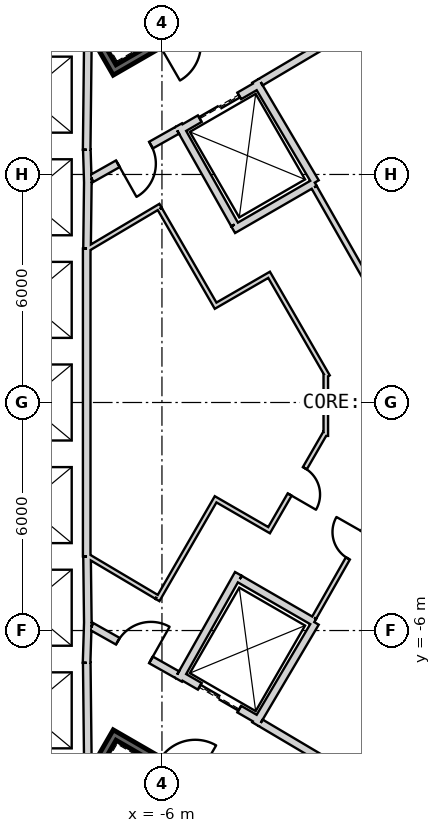
"""IFC4 building model, lengths in metres.
Left out: names, types, materials, properties, quantities, classifications, styles, units other than length and angle.
Written with IfcOpenShell. Run it as: python <this file> out.ifc"""

import sys

from ifc_helpers import new_model, si_unit, direction, frame, frame_2d, origin, place, context, subcontext, project, spatial, rectangle, extrude, element, fill, save


model = new_model("IFC4")
c1 = context("Model", 3, precision=1e-05, world=origin(), true_north=direction((0.0, 1.0)))
c2 = subcontext(c1, "Body", "Model", "MODEL_VIEW")
j1 = project(units=[si_unit("LENGTHUNIT", "METRE"), si_unit("PLANEANGLEUNIT", "RADIAN")], contexts=[c1])
p1 = place(None, origin())
s1 = spatial("IfcSite", under=j1, at=p1, CompositionType="ELEMENT")
p2 = place(p1, origin())
s2 = spatial("IfcBuilding", under=s1, at=p2, CompositionType="ELEMENT")
p3 = place(p2, frame((0.0, 0.0, 322.1)))
s3 = spatial("IfcBuildingStorey", under=s2, at=p3, CompositionType="ELEMENT", Elevation=322.1)
p4 = place(p3, frame((19.475, 2.208, 0.0), z_axis=(0.0, 0.0, 1.0), x_axis=(-0.866028369851, 0.499994862586, 0.0)))
e1 = element("IfcWall", 1, at=p4, inside=s3, PredefinedType="SHEAR", context=c2, shape_type="SweptSolid", body=[
    extrude(rectangle(XDim=31.523, YDim=0.9, at=frame_2d((15.762, 0.0))), origin(), (0.0, 0.0, 1.0), 3.9),
])
p5 = place(p4, frame((7.062, 0.0, 0.0)))
e2 = element("IfcOpeningElement", 2, at=p5, cuts=e1, PredefinedType="OPENING", context=c2, shape_type="SweptSolid", body=[
    extrude(rectangle(XDim=1.2, YDim=2.4, at=frame_2d((0.6, 1.2))), frame((0.0, 0.46, 0.0), z_axis=(0.0, -1.0, 0.0), x_axis=(1.0, 0.0, 0.0)), (0.0, 0.0, 1.0), 0.92),
])
p6 = place(p4, frame((3.612, 0.0, 0.0)))
e3 = element("IfcOpeningElement", 3, at=p6, cuts=e1, PredefinedType="OPENING", context=c2, shape_type="SweptSolid", body=[
    extrude(rectangle(XDim=1.2, YDim=2.4, at=frame_2d((0.6, 1.2))), frame((0.0, 0.46, 0.0), z_axis=(0.0, -1.0, 0.0), x_axis=(1.0, 0.0, 0.0)), (0.0, 0.0, 1.0), 0.92),
])
p7 = place(p4, frame((26.712, 0.0, 0.0)))
e4 = element("IfcOpeningElement", 4, at=p7, cuts=e1, PredefinedType="OPENING", context=c2, shape_type="SweptSolid", body=[
    extrude(rectangle(XDim=1.2, YDim=2.4, at=frame_2d((0.6, 1.2))), frame((0.0, 0.46, 0.0), z_axis=(0.0, -1.0, 0.0), x_axis=(1.0, 0.0, 0.0)), (0.0, 0.0, 1.0), 0.92),
])
p8 = place(p3, frame((-7.825, -17.97, 0.0), z_axis=(0.0, 0.0, 1.0), x_axis=(0.866028369851, 0.499994862586, 0.0)))
e5 = element("IfcWall", 5, at=p8, inside=s3, PredefinedType="SHEAR", context=c2, shape_type="SweptSolid", body=[
    extrude(rectangle(XDim=31.523, YDim=0.9, at=frame_2d((15.762, 0.0))), origin(), (0.0, 0.0, 1.0), 3.9),
])
p9 = place(p8, frame((17.862, 0.0, 0.0)))
e6 = element("IfcOpeningElement", 6, at=p9, cuts=e5, PredefinedType="OPENING", context=c2, shape_type="SweptSolid", body=[
    extrude(rectangle(XDim=1.2, YDim=2.4, at=frame_2d((0.6, 1.2))), frame((0.0, 0.46, 0.0), z_axis=(0.0, -1.0, 0.0), x_axis=(1.0, 0.0, 0.0)), (0.0, 0.0, 1.0), 0.92),
])
p10 = place(p8, frame((20.562, 0.0, 0.0)))
e7 = element("IfcOpeningElement", 7, at=p10, cuts=e5, PredefinedType="OPENING", context=c2, shape_type="SweptSolid", body=[
    extrude(rectangle(XDim=1.2, YDim=2.4, at=frame_2d((0.6, 1.2))), frame((0.0, 0.46, 0.0), z_axis=(0.0, -1.0, 0.0), x_axis=(1.0, 0.0, 0.0)), (0.0, 0.0, 1.0), 0.92),
])
p11 = place(p8, frame((26.712, 0.0, 0.0)))
e8 = element("IfcOpeningElement", 8, at=p11, cuts=e5, PredefinedType="OPENING", context=c2, shape_type="SweptSolid", body=[
    extrude(rectangle(XDim=1.2, YDim=2.4, at=frame_2d((0.6, 1.2))), frame((0.0, 0.46, 0.0), z_axis=(0.0, -1.0, 0.0), x_axis=(1.0, 0.0, 0.0)), (0.0, 0.0, 1.0), 0.92),
])
p12 = place(p8, frame((3.612, 0.0, 0.0)))
e9 = element("IfcOpeningElement", 9, at=p12, cuts=e5, PredefinedType="OPENING", context=c2, shape_type="SweptSolid", body=[
    extrude(rectangle(XDim=1.2, YDim=2.4, at=frame_2d((0.6, 1.2))), frame((0.0, 0.46, 0.0), z_axis=(0.0, -1.0, 0.0), x_axis=(1.0, 0.0, 0.0)), (0.0, 0.0, 1.0), 0.92),
])
p13 = place(p3, frame((-7.951, 9.35, 0.0), z_axis=(0.0, 0.0, 1.0), x_axis=(-0.011120469654, -0.999938165666, 0.0)))
e10 = element("IfcWall", 10, at=p13, inside=s3, PredefinedType="PLUMBINGWALL", context=c2, shape_type="SweptSolid", body=[
    extrude(rectangle(XDim=2.7, YDim=0.2, at=frame_2d((1.35, 0.0))), origin(), (0.0, 0.0, 1.0), 3.6),
])
p14 = place(p3, frame((-7.977, 6.65, 0.0), z_axis=(0.0, 0.0, 1.0), x_axis=(0.030861509705, -0.999523670164, 0.0)))
e11 = element("IfcWall", 11, at=p14, inside=s3, PredefinedType="PLUMBINGWALL", context=c2, shape_type="SweptSolid", body=[
    extrude(rectangle(XDim=0.878, YDim=0.2, at=frame_2d((0.439, 0.0))), origin(), (0.0, 0.0, 1.0), 3.6),
])
p15 = place(p3, frame((-7.949, 5.895, 0.0), z_axis=(0.0, 0.0, 1.0), x_axis=(-0.012042535896, -0.999927486035, 0.0)))
e12 = element("IfcWall", 12, at=p15, inside=s3, PredefinedType="PLUMBINGWALL", context=c2, shape_type="SweptSolid", body=[
    extrude(rectangle(XDim=1.845, YDim=0.2, at=frame_2d((0.922, 0.0))), origin(), (0.0, 0.0, 1.0), 3.6),
])
p16 = place(p3, frame((-7.98, 4.05, 0.0), z_axis=(0.0, 0.0, 1.0), x_axis=(0.0, -1.0, 0.0)))
e13 = element("IfcWall", 13, at=p16, inside=s3, PredefinedType="PLUMBINGWALL", context=c2, shape_type="SweptSolid", body=[
    extrude(rectangle(XDim=8.1, YDim=0.2, at=frame_2d((4.05, 0.0))), origin(), (0.0, 0.0, 1.0), 3.6),
])
p17 = place(p3, frame((-7.95, -5.772, 0.0), z_axis=(0.0, 0.0, 1.0), x_axis=(-0.030803413295, -0.999525462272, 0.0)))
e14 = element("IfcWall", 14, at=p17, inside=s3, PredefinedType="PLUMBINGWALL", context=c2, shape_type="SweptSolid", body=[
    extrude(rectangle(XDim=1.078, YDim=0.2, at=frame_2d((0.539, 0.0))), origin(), (0.0, 0.0, 1.0), 3.6),
])
p18 = place(p3, frame((-7.971, -4.05, 0.0), z_axis=(0.0, 0.0, 1.0), x_axis=(0.012042535896, -0.999927486035, 0.0)))
e15 = element("IfcWall", 15, at=p18, inside=s3, PredefinedType="PLUMBINGWALL", context=c2, shape_type="SweptSolid", body=[
    extrude(rectangle(XDim=1.845, YDim=0.2, at=frame_2d((0.922, 0.0))), origin(), (0.0, 0.0, 1.0), 3.6),
])
p19 = place(p3, frame((-7.979, -6.85, 0.0), z_axis=(0.0, 0.0, 1.0), x_axis=(0.011121475088, -0.999938154483, 0.0)))
e16 = element("IfcWall", 16, at=p19, inside=s3, PredefinedType="PLUMBINGWALL", context=c2, shape_type="SweptSolid", body=[
    extrude(rectangle(XDim=2.7, YDim=0.2, at=frame_2d((1.35, 0.0))), origin(), (0.0, 0.0, 1.0), 3.6),
])
p20 = place(p3, frame((-11.245, 15.678, -0.3), z_axis=(0.0, 0.0, 1.0), x_axis=(0.499977274689, -0.866038523851, 0.0)))
e17 = element("IfcWall", 17, at=p20, inside=s3, PredefinedType="SHEAR", context=c2, shape_type="SweptSolid", body=[
    extrude(rectangle(XDim=8.1, YDim=0.2, at=frame_2d((4.05, 0.0))), origin(), (0.0, 0.0, 1.0), 3.9),
])
p21 = place(p3, frame((-7.159, 8.8, -0.3), z_axis=(0.0, 0.0, 1.0), x_axis=(0.866047807691, 0.499961193289, 0.0)))
e18 = element("IfcWall", 18, at=p21, inside=s3, PredefinedType="SHEAR", context=c2, shape_type="SweptSolid", body=[
    extrude(rectangle(XDim=3.6, YDim=0.2, at=frame_2d((1.8, 0.0))), origin(), (0.0, 0.0, 1.0), 3.9),
])
p22 = place(p21, frame((1.25, 0.0, 0.3)))
e19 = element("IfcOpeningElement", 19, at=p22, cuts=e18, PredefinedType="OPENING", context=c2, shape_type="SweptSolid", body=[
    extrude(rectangle(XDim=1.1, YDim=2.1, at=frame_2d((0.55, 1.05))), frame((0.0, 0.11, 0.0), z_axis=(0.0, -1.0, 0.0), x_axis=(1.0, 0.0, 0.0)), (0.0, 0.0, 1.0), 0.22),
])
p23 = place(p3, frame((-5.524, 7.168, 0.0), z_axis=(0.0, 0.0, 1.0), x_axis=(0.866024647952, 0.500001309137, 0.0)))
e20 = element("IfcWall", 20, at=p23, inside=s3, PredefinedType="PLUMBINGWALL", context=c2, shape_type="SweptSolid", body=[
    extrude(rectangle(XDim=2.4, YDim=0.2, at=frame_2d((1.2, 0.0))), origin(), (0.0, 0.0, 1.0), 3.6),
])
p24 = place(p23, frame((0.6, 0.0, 0.0)))
e21 = element("IfcOpeningElement", 21, at=p24, cuts=e20, PredefinedType="OPENING", context=c2, shape_type="SweptSolid", body=[
    extrude(rectangle(XDim=1.2, YDim=2.4, at=frame_2d((0.6, 1.2))), frame((0.0, 0.11, 0.0), z_axis=(0.0, -1.0, 0.0), x_axis=(1.0, 0.0, 0.0)), (0.0, 0.0, 1.0), 0.22),
])
p25 = place(p3, frame((-3.538, 8.465, 0.0), z_axis=(0.0, 0.0, 1.0), x_axis=(0.508647062354, -0.860975125052, 0.0)))
e22 = element("IfcWall", 22, at=p25, inside=s3, PredefinedType="PLUMBINGWALL", context=c2, shape_type="SweptSolid", body=[
    extrude(rectangle(XDim=3.1, YDim=0.2, at=frame_2d((1.55, 0.0))), origin(), (0.0, 0.0, 1.0), 3.6),
])
p26 = place(p3, frame((-1.979, 5.786, 0.0), z_axis=(0.0, 0.0, 1.0), x_axis=(-0.866016689309, -0.500015093611, 0.0)))
e23 = element("IfcWall", 23, at=p26, inside=s3, PredefinedType="PLUMBINGWALL", context=c2, shape_type="SweptSolid", body=[
    extrude(rectangle(XDim=2.479, YDim=0.2, at=frame_2d((1.24, 0.0))), origin(), (0.0, 0.0, 1.0), 3.6),
])
p27 = place(p3, frame((-5.562, 7.296, 0.0), z_axis=(0.0, 0.0, 1.0), x_axis=(0.49134651263, -0.870964180966, 0.0)))
e24 = element("IfcWall", 24, at=p27, inside=s3, PredefinedType="PLUMBINGWALL", context=c2, shape_type="SweptSolid", body=[
    extrude(rectangle(XDim=3.0, YDim=0.2, at=frame_2d((1.5, 0.0))), origin(), (0.0, 0.0, 1.0), 3.6),
])
p28 = place(p3, frame((-7.196, -8.663, -0.3), z_axis=(0.0, 0.0, 1.0), x_axis=(-0.499997992926, -0.866026562566, 0.0)))
e25 = element("IfcWall", 25, at=p28, inside=s3, PredefinedType="SHEAR", context=c2, shape_type="SweptSolid", body=[
    extrude(rectangle(XDim=7.9, YDim=0.2, at=frame_2d((3.95, 0.0))), origin(), (0.0, 0.0, 1.0), 3.9),
])
p29 = place(p3, frame((-4.041, -10.599, -0.3), z_axis=(0.0, 0.0, 1.0), x_axis=(-0.866047807691, 0.499961193289, 0.0)))
e26 = element("IfcWall", 26, at=p29, inside=s3, PredefinedType="SHEAR", context=c2, shape_type="SweptSolid", body=[
    extrude(rectangle(XDim=3.6, YDim=0.2, at=frame_2d((1.8, 0.0))), origin(), (0.0, 0.0, 1.0), 3.9),
])
p30 = place(p29, frame((1.25, 0.0, 0.3)))
e27 = element("IfcOpeningElement", 27, at=p30, cuts=e26, PredefinedType="OPENING", context=c2, shape_type="SweptSolid", body=[
    extrude(rectangle(XDim=1.1, YDim=2.1, at=frame_2d((0.55, 1.05))), frame((0.0, 0.11, 0.0), z_axis=(0.0, -1.0, 0.0), x_axis=(1.0, 0.0, 0.0)), (0.0, 0.0, 1.0), 0.22),
])
p31 = place(p3, frame((-3.446, -8.368, 0.0), z_axis=(0.0, 0.0, 1.0), x_axis=(-0.866024647952, 0.500001309137, 0.0)))
e28 = element("IfcWall", 28, at=p31, inside=s3, PredefinedType="PLUMBINGWALL", context=c2, shape_type="SweptSolid", body=[
    extrude(rectangle(XDim=2.4, YDim=0.2, at=frame_2d((1.2, 0.0))), origin(), (0.0, 0.0, 1.0), 3.6),
])
p32 = place(p31, frame((0.6, 0.0, 0.0)))
e29 = element("IfcOpeningElement", 29, at=p32, cuts=e28, PredefinedType="OPENING", context=c2, shape_type="SweptSolid", body=[
    extrude(rectangle(XDim=1.2, YDim=2.4, at=frame_2d((0.6, 1.2))), frame((0.0, 0.11, 0.0), z_axis=(0.0, -1.0, 0.0), x_axis=(1.0, 0.0, 0.0)), (0.0, 0.0, 1.0), 0.22),
])
p33 = place(p3, frame((-1.961, -5.796, 0.0), z_axis=(0.0, 0.0, 1.0), x_axis=(-0.508647062354, -0.860975125052, 0.0)))
e30 = element("IfcWall", 30, at=p33, inside=s3, PredefinedType="PLUMBINGWALL", context=c2, shape_type="SweptSolid", body=[
    extrude(rectangle(XDim=3.1, YDim=0.2, at=frame_2d((1.55, 0.0))), origin(), (0.0, 0.0, 1.0), 3.6),
])
p34 = place(p3, frame((-3.99, -4.509, 0.0), z_axis=(0.0, 0.0, 1.0), x_axis=(-0.491358283181, -0.870957540612, 0.0)))
e31 = element("IfcWall", 31, at=p34, inside=s3, PredefinedType="PLUMBINGWALL", context=c2, shape_type="SweptSolid", body=[
    extrude(rectangle(XDim=3.2, YDim=0.2, at=frame_2d((1.6, 0.0))), origin(), (0.0, 0.0, 1.0), 3.6),
])
p35 = place(p3, frame((-3.953, -4.646, 0.0), z_axis=(0.0, 0.0, 1.0), x_axis=(0.866065302921, -0.4999308863, 0.0)))
e32 = element("IfcWall", 32, at=p35, inside=s3, PredefinedType="PLUMBINGWALL", context=c2, shape_type="SweptSolid", body=[
    extrude(rectangle(XDim=2.264, YDim=0.2, at=frame_2d((1.132, 0.0))), origin(), (0.0, 0.0, 1.0), 3.6),
])
p36 = place(p3, frame((5.159, 6.236, 0.0), z_axis=(0.0, 0.0, 1.0), x_axis=(-0.868105023632, 0.496380567654, 0.0)))
e33 = element("IfcWall", 33, at=p36, inside=s3, PredefinedType="PLUMBINGWALL", context=c2, shape_type="SweptSolid", body=[
    extrude(rectangle(XDim=7.072, YDim=0.15, at=frame_2d((3.536, 0.0))), origin(), (0.0, 0.0, 1.0), 3.6),
])
p37 = place(p3, frame((-1.023, -9.772, 0.0), z_axis=(0.0, 0.0, 1.0), x_axis=(0.874290944206, 0.485402250592, 0.0)))
e34 = element("IfcWall", 34, at=p37, inside=s3, PredefinedType="PARTITIONING", context=c2, shape_type="SweptSolid", body=[
    extrude(rectangle(XDim=1.723, YDim=0.12, at=frame_2d((0.861, 0.0))), origin(), (0.0, 0.0, 1.0), 3.6),
])
p38 = place(p3, frame((-1.055, 9.818, 0.0), z_axis=(0.0, 0.0, 1.0), x_axis=(-0.860614334655, -0.50925726994, 0.0)))
e35 = element("IfcWall", 35, at=p38, inside=s3, PredefinedType="PARTITIONING", context=c2, shape_type="SweptSolid", body=[
    extrude(rectangle(XDim=2.726, YDim=0.2, at=frame_2d((1.363, 0.0))), origin(), (0.0, 0.0, 1.0), 3.6),
])
p39 = place(p3, frame((-5.6, 7.16, 0.0), z_axis=(0.0, 0.0, 1.0), x_axis=(-0.871363259478, -0.490638431059, 0.0)))
e36 = element("IfcWall", 36, at=p39, inside=s3, PredefinedType="PARTITIONING", context=c2, shape_type="SweptSolid", body=[
    extrude(rectangle(XDim=2.581, YDim=0.2, at=frame_2d((1.291, 0.0))), origin(), (0.0, 0.0, 1.0), 3.6),
])
p40 = place(p39, frame((0.791, 0.0, 0.0)))
e37 = element("IfcOpeningElement", 37, at=p40, cuts=e36, PredefinedType="OPENING", context=c2, shape_type="SweptSolid", body=[
    extrude(rectangle(XDim=1.0, YDim=2.1, at=frame_2d((0.5, 1.05))), frame((0.0, 0.11, 0.0), z_axis=(0.0, -1.0, 0.0), x_axis=(1.0, 0.0, 0.0)), (0.0, 0.0, 1.0), 0.22),
])
p41 = place(p3, frame((-3.401, -8.43, 0.0), z_axis=(0.0, 0.0, 1.0), x_axis=(0.860630814782, -0.509229418482, 0.0)))
e38 = element("IfcWall", 38, at=p41, inside=s3, PredefinedType="PARTITIONING", context=c2, shape_type="SweptSolid", body=[
    extrude(rectangle(XDim=2.582, YDim=0.2, at=frame_2d((1.291, 0.0))), origin(), (0.0, 0.0, 1.0), 3.6),
])
p42 = place(p3, frame((-7.849, -5.894, 0.0), z_axis=(0.0, 0.0, 1.0), x_axis=(0.871363259478, -0.490638431059, 0.0)))
e39 = element("IfcWall", 39, at=p42, inside=s3, PredefinedType="PARTITIONING", context=c2, shape_type="SweptSolid", body=[
    extrude(rectangle(XDim=2.581, YDim=0.2, at=frame_2d((1.291, 0.0))), origin(), (0.0, 0.0, 1.0), 3.6),
])
p43 = place(p42, frame((0.791, 0.0, 0.0)))
e40 = element("IfcOpeningElement", 40, at=p43, cuts=e39, PredefinedType="OPENING", context=c2, shape_type="SweptSolid", body=[
    extrude(rectangle(XDim=1.0, YDim=2.1, at=frame_2d((0.5, 1.05))), frame((0.0, 0.11, 0.0), z_axis=(0.0, -1.0, 0.0), x_axis=(1.0, 0.0, 0.0)), (0.0, 0.0, 1.0), 0.22),
])
p44 = place(p3, frame((-1.994, 5.661, 0.0), z_axis=(0.0, 0.0, 1.0), x_axis=(0.494341211302, -0.869267948798, 0.0)))
e41 = element("IfcWall", 41, at=p44, inside=s3, PredefinedType="PLUMBINGWALL", context=c2, shape_type="SweptSolid", body=[
    extrude(rectangle(XDim=4.361, YDim=0.15, at=frame_2d((2.18, 0.0))), origin(), (0.0, 0.0, 1.0), 3.6),
])
p45 = place(p3, frame((0.224, -1.761, 0.0), z_axis=(0.0, 0.0, 1.0), x_axis=(-0.494327216836, -0.869275907118, 0.0)))
e42 = element("IfcWall", 42, at=p45, inside=s3, PredefinedType="PARTITIONING", context=c2, shape_type="SweptSolid", body=[
    extrude(rectangle(XDim=4.487, YDim=0.12, at=frame_2d((2.244, 0.0))), origin(), (0.0, 0.0, 1.0), 3.6),
])
p46 = place(p45, frame((1.895, 0.0, 0.0)))
e43 = element("IfcOpeningElement", 43, at=p46, cuts=e42, PredefinedType="OPENING", context=c2, shape_type="SweptSolid", body=[
    extrude(rectangle(XDim=0.8, YDim=2.1, at=frame_2d((0.4, 1.05))), frame((0.0, 0.07, 0.0), z_axis=(0.0, -1.0, 0.0), x_axis=(1.0, 0.0, 0.0)), (0.0, 0.0, 1.0), 0.14),
])
p47 = place(p3, frame((-6.037, 5.176, 0.0), z_axis=(0.0, 0.0, 1.0), x_axis=(-0.860106072674, -0.510115225953, 0.0)))
e44 = element("IfcWall", 44, at=p47, inside=s3, PredefinedType="PARTITIONING", context=c2, shape_type="SweptSolid", body=[
    extrude(rectangle(XDim=2.225, YDim=0.12, at=frame_2d((1.112, 0.0))), origin(), (0.0, 0.0, 1.0), 3.6),
])
p48 = place(p3, frame((-4.558, 2.495, 0.0), z_axis=(0.0, 0.0, 1.0), x_axis=(-0.499990139034, 0.866031096941, 0.0)))
e45 = element("IfcWall", 45, at=p48, inside=s3, PredefinedType="PARTITIONING", context=c2, shape_type="SweptSolid", body=[
    extrude(rectangle(XDim=3.0, YDim=0.12, at=frame_2d((1.5, 0.0))), origin(), (0.0, 0.0, 1.0), 3.6),
])
p49 = place(p3, frame((-3.129, 3.39, 0.0), z_axis=(0.0, 0.0, 1.0), x_axis=(-0.866053003207, -0.499952193351, 0.0)))
e46 = element("IfcWall", 46, at=p49, inside=s3, PredefinedType="PARTITIONING", context=c2, shape_type="SweptSolid", body=[
    extrude(rectangle(XDim=1.625, YDim=0.12, at=frame_2d((0.812, 0.0))), origin(), (0.0, 0.0, 1.0), 3.6),
])
p50 = place(p3, frame((-1.637, 0.685, 0.0), z_axis=(0.0, 0.0, 1.0), x_axis=(-0.500006252586, 0.866021793822, 0.0)))
e47 = element("IfcWall", 47, at=p50, inside=s3, PredefinedType="PARTITIONING", context=c2, shape_type="SweptSolid", body=[
    extrude(rectangle(XDim=3.028, YDim=0.12, at=frame_2d((1.514, 0.0))), origin(), (0.0, 0.0, 1.0), 3.6),
])
p51 = place(p3, frame((-1.689, -0.879, 0.0), z_axis=(0.0, 0.0, 1.0), x_axis=(0.0, 1.0, 0.0)))
e48 = element("IfcWall", 48, at=p51, inside=s3, PredefinedType="PARTITIONING", context=c2, shape_type="SweptSolid", body=[
    extrude(rectangle(XDim=1.635, YDim=0.12, at=frame_2d((0.818, 0.0))), origin(), (0.0, 0.0, 1.0), 3.6),
])
p52 = place(p3, frame((-3.211, -3.412, 0.0), z_axis=(0.0, 0.0, 1.0), x_axis=(0.499983190554, 0.866035108505, 0.0)))
e49 = element("IfcWall", 49, at=p52, inside=s3, PredefinedType="PARTITIONING", context=c2, shape_type="SweptSolid", body=[
    extrude(rectangle(XDim=3.026, YDim=0.12, at=frame_2d((1.513, 0.0))), origin(), (0.0, 0.0, 1.0), 3.6),
])
p53 = place(p52, frame((1.143, 0.0, 0.0)))
e50 = element("IfcOpeningElement", 50, at=p53, cuts=e49, PredefinedType="OPENING", context=c2, shape_type="SweptSolid", body=[
    extrude(rectangle(XDim=0.8, YDim=2.1, at=frame_2d((0.4, 1.05))), frame((0.0, 0.07, 0.0), z_axis=(0.0, -1.0, 0.0), x_axis=(1.0, 0.0, 0.0)), (0.0, 0.0, 1.0), 0.14),
])
p54 = place(p3, frame((-4.64, -2.517, 0.0), z_axis=(0.0, 0.0, 1.0), x_axis=(0.866015446554, -0.500017246033, 0.0)))
e51 = element("IfcWall", 51, at=p54, inside=s3, PredefinedType="PARTITIONING", context=c2, shape_type="SweptSolid", body=[
    extrude(rectangle(XDim=1.625, YDim=0.12, at=frame_2d((0.812, 0.0))), origin(), (0.0, 0.0, 1.0), 3.6),
])
p55 = place(p3, frame((-6.118, -5.197, 0.0), z_axis=(0.0, 0.0, 1.0), x_axis=(0.499990139034, 0.866031096941, 0.0)))
e52 = element("IfcWall", 52, at=p55, inside=s3, PredefinedType="PARTITIONING", context=c2, shape_type="SweptSolid", body=[
    extrude(rectangle(XDim=3.0, YDim=0.12, at=frame_2d((1.5, 0.0))), origin(), (0.0, 0.0, 1.0), 3.6),
])
p56 = place(p3, frame((-7.95, -4.041, 0.0), z_axis=(0.0, 0.0, 1.0), x_axis=(0.860112457103, -0.510104461004, 0.0)))
e53 = element("IfcWall", 53, at=p56, inside=s3, PredefinedType="PARTITIONING", context=c2, shape_type="SweptSolid", body=[
    extrude(rectangle(XDim=2.104, YDim=0.12, at=frame_2d((1.052, 0.0))), origin(), (0.0, 0.0, 1.0), 3.6),
])
p57 = place(p3, frame((22.074, 5.153, 0.0), z_axis=(0.0, 0.0, 1.0), x_axis=(-0.866023485483, 0.500003322581, 0.0)))
e54 = element("IfcWall", 54, at=p57, inside=s3, PredefinedType="PARTITIONING", context=c2, shape_type="SweptSolid", body=[
    extrude(rectangle(XDim=32.881, YDim=0.2, at=frame_2d((16.44, 0.0))), origin(), (0.0, 0.0, 1.0), 2.97),
])
p58 = place(p57, frame((28.249, 0.0, 0.0)))
e55 = element("IfcOpeningElement", 55, at=p58, cuts=e54, PredefinedType="OPENING", context=c2, shape_type="SweptSolid", body=[
    extrude(rectangle(XDim=1.0, YDim=2.1, at=frame_2d((0.5, 1.05))), frame((0.0, 0.11, 0.0), z_axis=(0.0, -1.0, 0.0), x_axis=(1.0, 0.0, 0.0)), (0.0, 0.0, 1.0), 0.22),
])
p59 = place(p57, frame((16.387, 0.0, 0.0)))
e56 = element("IfcOpeningElement", 56, at=p59, cuts=e54, PredefinedType="OPENING", context=c2, shape_type="SweptSolid", body=[
    extrude(rectangle(XDim=1.0, YDim=2.1, at=frame_2d((0.5, 1.05))), frame((0.0, 0.11, 0.0), z_axis=(0.0, -1.0, 0.0), x_axis=(1.0, 0.0, 0.0)), (0.0, 0.0, 1.0), 0.22),
])
p60 = place(p57, frame((4.128, 0.0, 0.0)))
e57 = element("IfcOpeningElement", 57, at=p60, cuts=e54, PredefinedType="OPENING", context=c2, shape_type="SweptSolid", body=[
    extrude(rectangle(XDim=1.0, YDim=2.1, at=frame_2d((0.5, 1.05))), frame((0.0, 0.11, 0.0), z_axis=(0.0, -1.0, 0.0), x_axis=(1.0, 0.0, 0.0)), (0.0, 0.0, 1.0), 0.22),
])
p61 = place(p3, frame((-6.505, -21.885, 0.0), z_axis=(0.0, 0.0, 1.0), x_axis=(0.86602457258, 0.500001439686, 0.0)))
e58 = element("IfcWall", 58, at=p61, inside=s3, PredefinedType="PARTITIONING", context=c2, shape_type="SweptSolid", body=[
    extrude(rectangle(XDim=32.952, YDim=0.2, at=frame_2d((16.476, 0.0))), origin(), (0.0, 0.0, 1.0), 2.97),
])
p62 = place(p61, frame((20.569, 0.0, 0.0)))
e59 = element("IfcOpeningElement", 59, at=p62, cuts=e58, PredefinedType="OPENING", context=c2, shape_type="SweptSolid", body=[
    extrude(rectangle(XDim=1.0, YDim=2.1, at=frame_2d((0.5, 1.05))), frame((0.0, 0.11, 0.0), z_axis=(0.0, -1.0, 0.0), x_axis=(1.0, 0.0, 0.0)), (0.0, 0.0, 1.0), 0.22),
])
p63 = place(p61, frame((4.143, 0.0, 0.0)))
e60 = element("IfcOpeningElement", 60, at=p63, cuts=e58, PredefinedType="OPENING", context=c2, shape_type="SweptSolid", body=[
    extrude(rectangle(XDim=1.0, YDim=2.1, at=frame_2d((0.5, 1.05))), frame((0.0, 0.11, 0.0), z_axis=(0.0, -1.0, 0.0), x_axis=(1.0, 0.0, 0.0)), (0.0, 0.0, 1.0), 0.22),
])
p64 = place(p40, origin())
e61 = element("IfcDoor", 61, at=p64, inside=s3, OperationType="SINGLE_SWING_LEFT", PredefinedType="USERDEFINED", context=c2, shape_type="SweptSolid", body=[
    extrude(rectangle(XDim=1.0, YDim=2.1, at=frame_2d((0.5, 1.05))), frame((0.0, 0.025, 0.0), z_axis=(0.0, -1.0, 0.0), x_axis=(1.0, 0.0, 0.0)), (0.0, 0.0, 1.0), 0.05),
])
fill(e37, e61)
p65 = place(p24, origin())
e62 = element("IfcDoor", 62, at=p65, inside=s3, OperationType="SLIDING_TO_LEFT", PredefinedType="USERDEFINED", context=c2, shape_type="SweptSolid", body=[
    extrude(rectangle(XDim=1.2, YDim=2.4, at=frame_2d((0.6, 1.2))), frame((0.0, 0.025, 0.0), z_axis=(0.0, -1.0, 0.0), x_axis=(1.0, 0.0, 0.0)), (0.0, 0.0, 1.0), 0.05),
])
fill(e21, e62)
p66 = place(p43, origin())
e63 = element("IfcDoor", 63, at=p66, inside=s3, OperationType="SINGLE_SWING_RIGHT", PredefinedType="USERDEFINED", context=c2, shape_type="SweptSolid", body=[
    extrude(rectangle(XDim=1.0, YDim=2.1, at=frame_2d((0.5, 1.05))), frame((0.0, 0.025, 0.0), z_axis=(0.0, -1.0, 0.0), x_axis=(1.0, 0.0, 0.0)), (0.0, 0.0, 1.0), 0.05),
])
fill(e40, e63)
p67 = place(p32, origin())
e64 = element("IfcDoor", 64, at=p67, inside=s3, OperationType="SLIDING_TO_LEFT", PredefinedType="USERDEFINED", context=c2, shape_type="SweptSolid", body=[
    extrude(rectangle(XDim=1.2, YDim=2.4, at=frame_2d((0.6, 1.2))), frame((0.0, 0.025, 0.0), z_axis=(0.0, -1.0, 0.0), x_axis=(1.0, 0.0, 0.0)), (0.0, 0.0, 1.0), 0.05),
])
fill(e29, e64)
p68 = place(p46, origin())
e65 = element("IfcDoor", 65, at=p68, inside=s3, OperationType="SINGLE_SWING_RIGHT", PredefinedType="USERDEFINED", context=c2, shape_type="SweptSolid", body=[
    extrude(rectangle(XDim=0.8, YDim=2.1, at=frame_2d((0.4, 1.05))), frame((0.0, 0.025, 0.0), z_axis=(0.0, -1.0, 0.0), x_axis=(1.0, 0.0, 0.0)), (0.0, 0.0, 1.0), 0.05),
])
fill(e43, e65)
p69 = place(p53, origin())
e66 = element("IfcDoor", 66, at=p69, inside=s3, OperationType="SINGLE_SWING_LEFT", PredefinedType="USERDEFINED", context=c2, shape_type="SweptSolid", body=[
    extrude(rectangle(XDim=0.8, YDim=2.1, at=frame_2d((0.4, 1.05))), frame((0.0, 0.025, 0.0), z_axis=(0.0, -1.0, 0.0), x_axis=(1.0, 0.0, 0.0)), (0.0, 0.0, 1.0), 0.05),
])
fill(e50, e66)
save(model, sys.argv[1])
